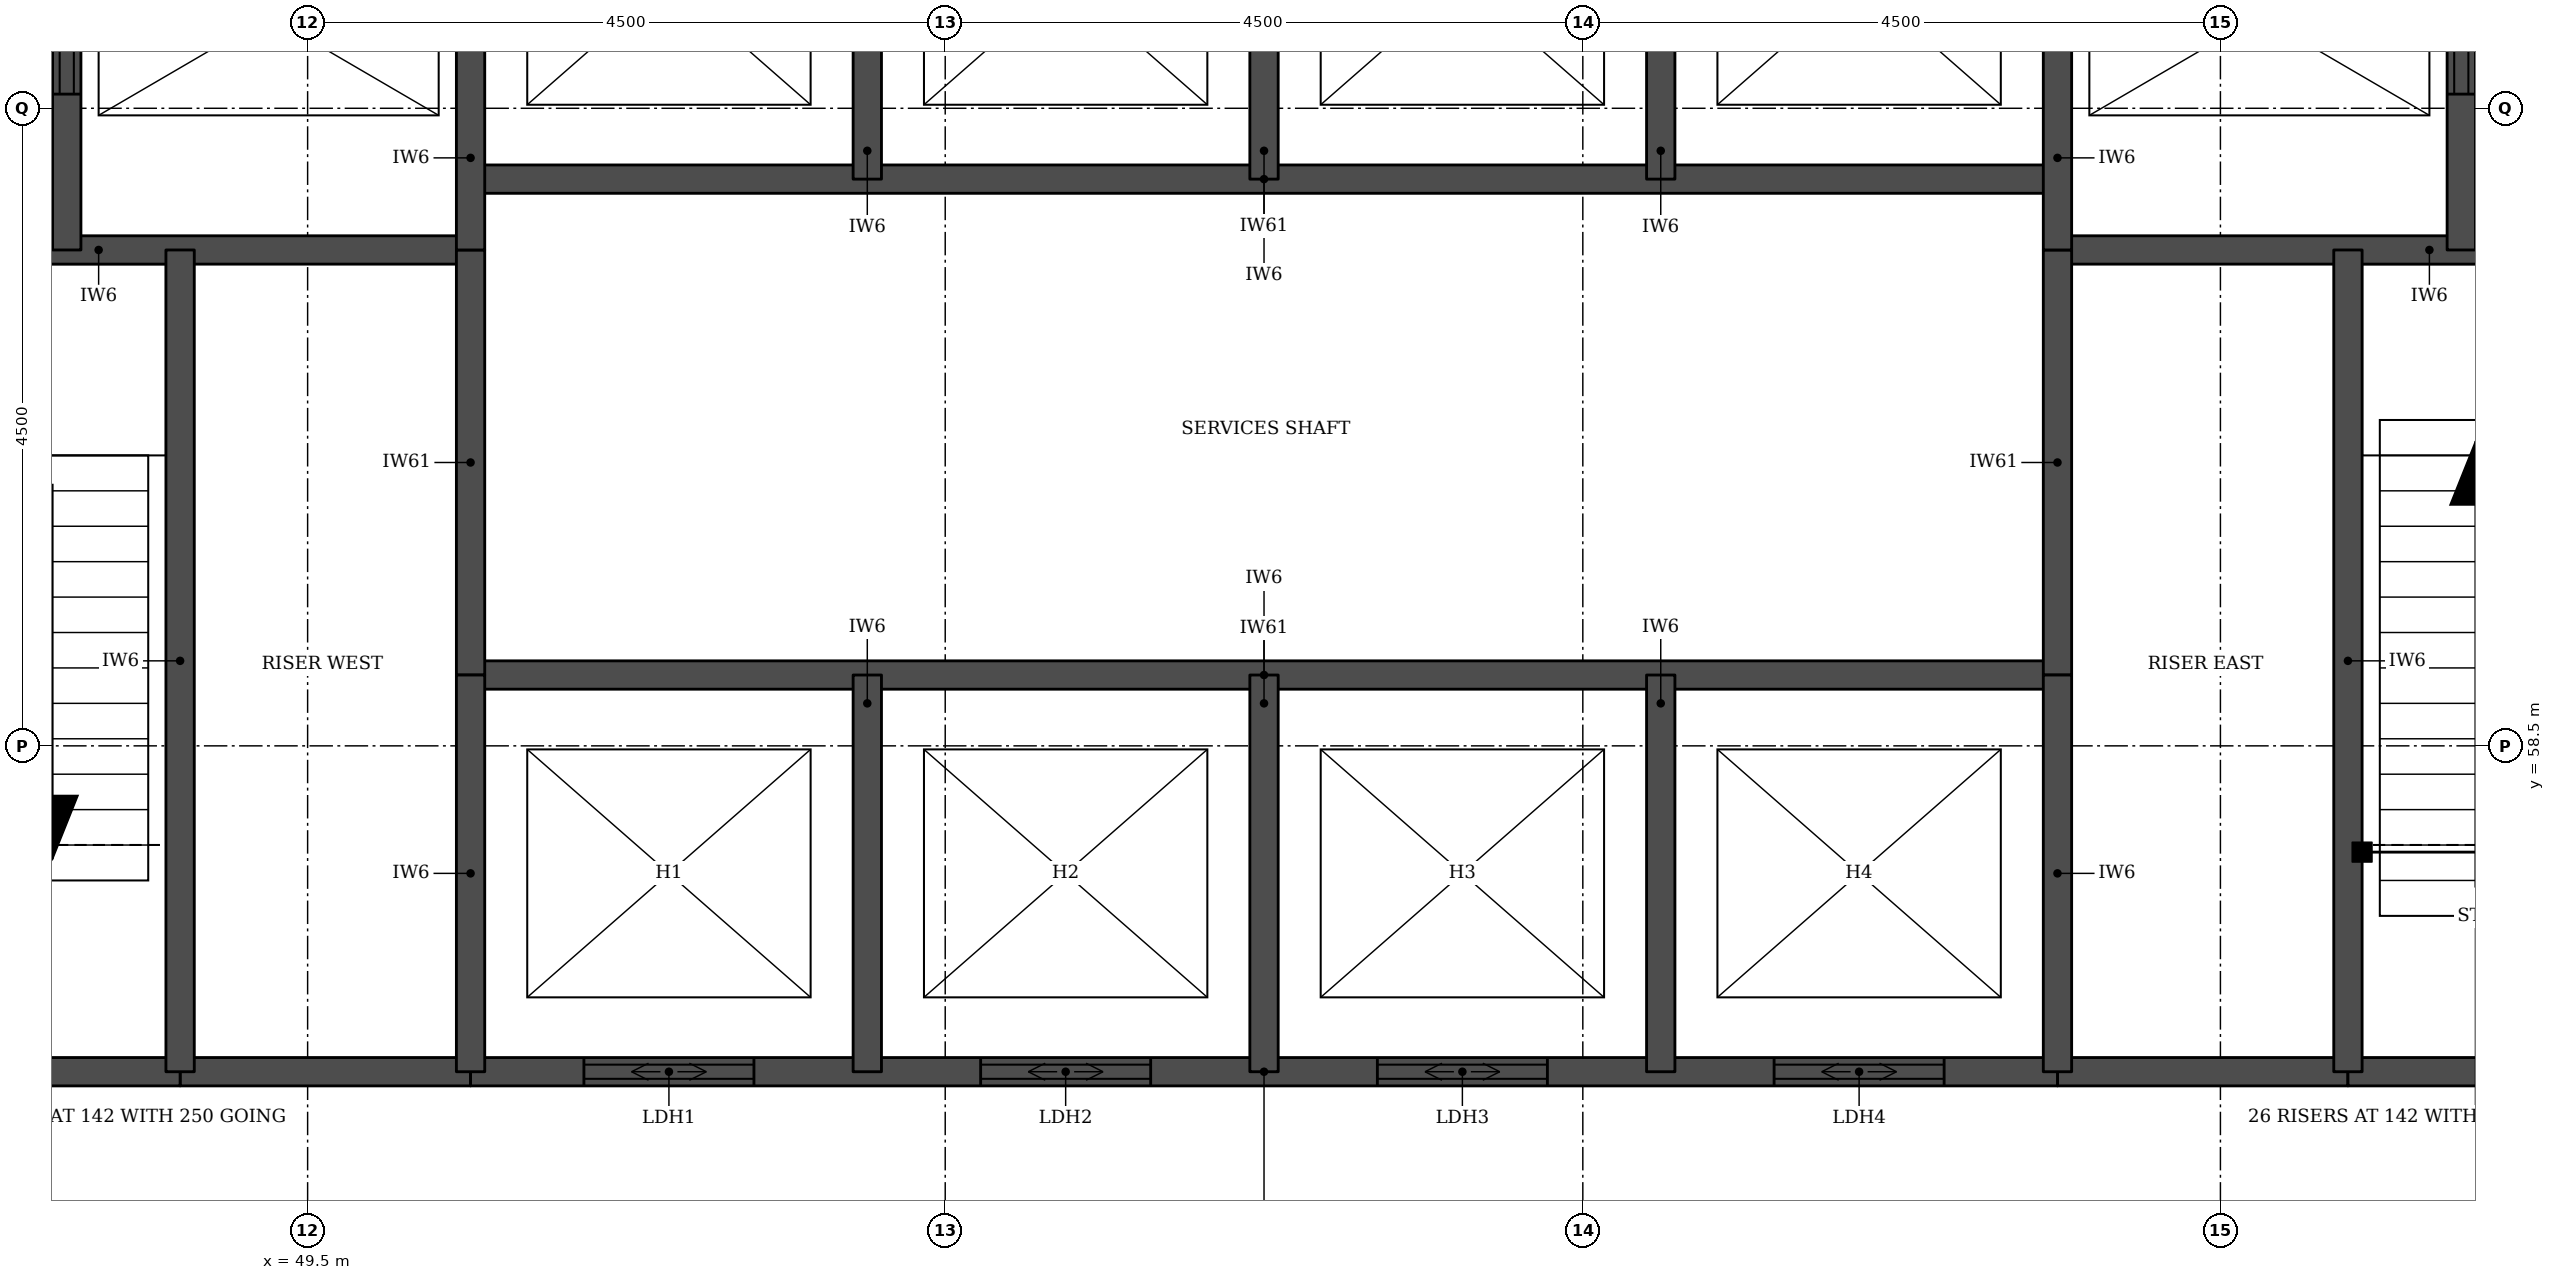
"""IFC4 building model, lengths in metres.
Left out: names, types, materials, properties, quantities, classifications, styles, units other than length and angle.
Written with IfcOpenShell. Run it as: python <this file> out.ifc"""

import sys

from ifc_helpers import new_model, si_unit, direction, frame, frame_2d, origin, place, context, subcontext, project, spatial, rectangle, extrude, element, fill, save


model = new_model("IFC4")
c1 = context("Model", 3, precision=1e-05, world=origin(), true_north=direction((0.0, 1.0)))
c2 = subcontext(c1, "Body", "Model", "MODEL_VIEW")
j1 = project(units=[si_unit("LENGTHUNIT", "METRE"), si_unit("PLANEANGLEUNIT", "RADIAN")], contexts=[c1])
p1 = place(None, origin())
s1 = spatial("IfcSite", under=j1, at=p1, CompositionType="ELEMENT")
p2 = place(p1, origin())
s2 = spatial("IfcBuilding", under=s1, at=p2, CompositionType="ELEMENT")
p3 = place(p2, frame((0.0, 0.0, 162.5)))
s3 = spatial("IfcBuildingStorey", under=s2, at=p3, CompositionType="ELEMENT", Elevation=162.5)
for number, where, z_axis, x_axis in (
    (1, (48.6, 56.2, 0.0), (0.0, 0.0, 1.0), (1.0, 0.0, 0.0)),
    (2, (61.85, 56.2, 0.0), (0.0, 0.0, 1.0), (1.0, 0.0, 0.0)),
):
    element("IfcWall", number, at=place(p3, frame(where, z_axis=z_axis, x_axis=x_axis)), inside=s3, PredefinedType="SOLIDWALL", context=c2, shape_type="SweptSolid", body=[
        extrude(rectangle(XDim=2.05, YDim=0.2, at=frame_2d((1.025, 0.0))), origin(), (0.0, 0.0, 1.0), 3.55),
    ])
p4 = place(p3, frame((45.4, 56.2, 0.0), z_axis=(0.0, 0.0, 1.0), x_axis=(1.0, 0.0, 0.0)))
e3 = element("IfcWall", 3, at=p4, inside=s3, PredefinedType="SOLIDWALL", context=c2, shape_type="SweptSolid", body=[
    extrude(rectangle(XDim=3.2, YDim=0.2, at=frame_2d((1.6, 0.0))), origin(), (0.0, 0.0, 1.0), 3.55),
])
p5 = place(p3, frame((50.65, 56.2, 0.0), z_axis=(0.0, 0.0, 1.0), x_axis=(1.0, 0.0, 0.0)))
e4 = element("IfcWall", 4, at=p5, inside=s3, PredefinedType="SOLIDWALL", context=c2, shape_type="SweptSolid", body=[
    extrude(rectangle(XDim=11.2, YDim=0.2, at=frame_2d((5.6, 0.0))), origin(), (0.0, 0.0, 1.0), 3.55),
])
p6 = place(p5, frame((0.8, 0.0, 0.0)))
e5 = element("IfcOpeningElement", 5, at=p6, cuts=e4, PredefinedType="OPENING", context=c2, shape_type="SweptSolid", body=[
    extrude(rectangle(XDim=1.2, YDim=2.1, at=frame_2d((0.6, 1.05))), frame((0.0, 0.11, 0.0), z_axis=(0.0, -1.0, 0.0), x_axis=(1.0, 0.0, 0.0)), (0.0, 0.0, 1.0), 0.22),
])
p7 = place(p5, frame((3.6, 0.0, 0.0)))
e6 = element("IfcOpeningElement", 6, at=p7, cuts=e4, PredefinedType="OPENING", context=c2, shape_type="SweptSolid", body=[
    extrude(rectangle(XDim=1.2, YDim=2.1, at=frame_2d((0.6, 1.05))), frame((0.0, 0.11, 0.0), z_axis=(0.0, -1.0, 0.0), x_axis=(1.0, 0.0, 0.0)), (0.0, 0.0, 1.0), 0.22),
])
p8 = place(p5, frame((6.4, 0.0, 0.0)))
e7 = element("IfcOpeningElement", 7, at=p8, cuts=e4, PredefinedType="OPENING", context=c2, shape_type="SweptSolid", body=[
    extrude(rectangle(XDim=1.2, YDim=2.1, at=frame_2d((0.6, 1.05))), frame((0.0, 0.11, 0.0), z_axis=(0.0, -1.0, 0.0), x_axis=(1.0, 0.0, 0.0)), (0.0, 0.0, 1.0), 0.22),
])
p9 = place(p5, frame((9.2, 0.0, 0.0)))
e8 = element("IfcOpeningElement", 8, at=p9, cuts=e4, PredefinedType="OPENING", context=c2, shape_type="SweptSolid", body=[
    extrude(rectangle(XDim=1.2, YDim=2.1, at=frame_2d((0.6, 1.05))), frame((0.0, 0.11, 0.0), z_axis=(0.0, -1.0, 0.0), x_axis=(1.0, 0.0, 0.0)), (0.0, 0.0, 1.0), 0.22),
])
p10 = place(p3, frame((63.9, 56.2, 0.0), z_axis=(0.0, 0.0, 1.0), x_axis=(1.0, 0.0, 0.0)))
e9 = element("IfcWall", 9, at=p10, inside=s3, PredefinedType="SOLIDWALL", context=c2, shape_type="SweptSolid", body=[
    extrude(rectangle(XDim=3.2, YDim=0.2, at=frame_2d((1.6, 0.0))), origin(), (0.0, 0.0, 1.0), 3.55),
])
p11 = place(p3, frame((50.65, 59.0, 0.0), z_axis=(0.0, 0.0, 1.0), x_axis=(1.0, 0.0, 0.0)))
e10 = element("IfcWall", 10, at=p11, inside=s3, PredefinedType="SOLIDWALL", context=c2, shape_type="SweptSolid", body=[
    extrude(rectangle(XDim=11.2, YDim=0.2, at=frame_2d((5.6, 0.0))), origin(), (0.0, 0.0, 1.0), 3.7),
])
for number, where, z_axis, x_axis in (
    (11, (45.4, 62.0, 0.0), (0.0, 0.0, 1.0), (1.0, 0.0, 0.0)),
    (12, (61.85, 62.0, 0.0), (0.0, 0.0, 1.0), (1.0, 0.0, 0.0)),
):
    element("IfcWall", number, at=place(p3, frame(where, z_axis=z_axis, x_axis=x_axis)), inside=s3, PredefinedType="SOLIDWALL", context=c2, shape_type="SweptSolid", body=[
        extrude(rectangle(XDim=5.25, YDim=0.2, at=frame_2d((2.625, 0.0))), origin(), (0.0, 0.0, 1.0), 3.55),
    ])
p12 = place(p3, frame((50.65, 62.5, 0.0), z_axis=(0.0, 0.0, 1.0), x_axis=(1.0, 0.0, 0.0)))
e13 = element("IfcWall", 13, at=p12, inside=s3, PredefinedType="SOLIDWALL", context=c2, shape_type="SweptSolid", body=[
    extrude(rectangle(XDim=11.2, YDim=0.2, at=frame_2d((5.6, 0.0))), origin(), (0.0, 0.0, 1.0), 3.7),
])
p13 = place(p3, frame((47.8, 62.0, 0.0), z_axis=(0.0, 0.0, 1.0), x_axis=(0.0, 1.0, 0.0)))
e14 = element("IfcWall", 14, at=p13, inside=s3, PredefinedType="SOLIDWALL", context=c2, shape_type="SweptSolid", body=[
    extrude(rectangle(XDim=3.3, YDim=0.2, at=frame_2d((1.65, 0.0))), origin(), (0.0, 0.0, 1.0), 3.55),
])
p14 = place(p13, frame((1.1, 0.0, 0.0)))
e15 = element("IfcOpeningElement", 15, at=p14, cuts=e14, PredefinedType="OPENING", context=c2, shape_type="SweptSolid", body=[
    extrude(rectangle(XDim=1.1, YDim=2.1, at=frame_2d((0.55, 1.05))), frame((0.0, 0.11, 0.0), z_axis=(0.0, -1.0, 0.0), x_axis=(1.0, 0.0, 0.0)), (0.0, 0.0, 1.0), 0.22),
])
p15 = place(p3, frame((48.6, 56.2, 0.0), z_axis=(0.0, 0.0, 1.0), x_axis=(0.0, 1.0, 0.0)))
e16 = element("IfcWall", 16, at=p15, inside=s3, PredefinedType="SOLIDWALL", context=c2, shape_type="SweptSolid", body=[
    extrude(rectangle(XDim=5.8, YDim=0.2, at=frame_2d((2.9, 0.0))), origin(), (0.0, 0.0, 1.0), 3.55),
])
p16 = place(p3, frame((50.65, 59.0, 0.0), z_axis=(0.0, 0.0, 1.0), x_axis=(0.0, 1.0, 0.0)))
e17 = element("IfcWall", 17, at=p16, inside=s3, PredefinedType="SOLIDWALL", context=c2, shape_type="SweptSolid", body=[
    extrude(rectangle(XDim=3.0, YDim=0.2, at=frame_2d((1.5, 0.0))), origin(), (0.0, 0.0, 1.0), 3.7),
])
p17 = place(p3, frame((50.65, 56.2, 0.0), z_axis=(0.0, 0.0, 1.0), x_axis=(0.0, 1.0, 0.0)))
e18 = element("IfcWall", 18, at=p17, inside=s3, PredefinedType="SOLIDWALL", context=c2, shape_type="SweptSolid", body=[
    extrude(rectangle(XDim=2.8, YDim=0.2, at=frame_2d((1.4, 0.0))), origin(), (0.0, 0.0, 1.0), 3.55),
])
p18 = place(p3, frame((50.65, 62.0, 0.0), z_axis=(0.0, 0.0, 1.0), x_axis=(0.0, 1.0, 0.0)))
e19 = element("IfcWall", 19, at=p18, inside=s3, PredefinedType="SOLIDWALL", context=c2, shape_type="SweptSolid", body=[
    extrude(rectangle(XDim=3.3, YDim=0.2, at=frame_2d((1.65, 0.0))), origin(), (0.0, 0.0, 1.0), 3.55),
])
for number, where, z_axis, x_axis in (
    (20, (53.45, 56.2, 0.0), (0.0, 0.0, 1.0), (0.0, 1.0, 0.0)),
    (21, (53.45, 62.5, 0.0), (0.0, 0.0, 1.0), (0.0, 1.0, 0.0)),
    (22, (56.25, 56.2, 0.0), (0.0, 0.0, 1.0), (0.0, 1.0, 0.0)),
    (23, (56.25, 62.5, 0.0), (0.0, 0.0, 1.0), (0.0, 1.0, 0.0)),
    (24, (59.05, 56.2, 0.0), (0.0, 0.0, 1.0), (0.0, 1.0, 0.0)),
    (25, (59.05, 62.5, 0.0), (0.0, 0.0, 1.0), (0.0, 1.0, 0.0)),
):
    element("IfcWall", number, at=place(p3, frame(where, z_axis=z_axis, x_axis=x_axis)), inside=s3, PredefinedType="SOLIDWALL", context=c2, shape_type="SweptSolid", body=[
        extrude(rectangle(XDim=2.8, YDim=0.2, at=frame_2d((1.4, 0.0))), origin(), (0.0, 0.0, 1.0), 3.55),
    ])
p19 = place(p3, frame((61.85, 59.0, 0.0), z_axis=(0.0, 0.0, 1.0), x_axis=(0.0, 1.0, 0.0)))
e26 = element("IfcWall", 26, at=p19, inside=s3, PredefinedType="SOLIDWALL", context=c2, shape_type="SweptSolid", body=[
    extrude(rectangle(XDim=3.0, YDim=0.2, at=frame_2d((1.5, 0.0))), origin(), (0.0, 0.0, 1.0), 3.7),
])
p20 = place(p3, frame((61.85, 56.2, 0.0), z_axis=(0.0, 0.0, 1.0), x_axis=(0.0, 1.0, 0.0)))
e27 = element("IfcWall", 27, at=p20, inside=s3, PredefinedType="SOLIDWALL", context=c2, shape_type="SweptSolid", body=[
    extrude(rectangle(XDim=2.8, YDim=0.2, at=frame_2d((1.4, 0.0))), origin(), (0.0, 0.0, 1.0), 3.55),
])
p21 = place(p3, frame((61.85, 62.0, 0.0), z_axis=(0.0, 0.0, 1.0), x_axis=(0.0, 1.0, 0.0)))
e28 = element("IfcWall", 28, at=p21, inside=s3, PredefinedType="SOLIDWALL", context=c2, shape_type="SweptSolid", body=[
    extrude(rectangle(XDim=3.3, YDim=0.2, at=frame_2d((1.65, 0.0))), origin(), (0.0, 0.0, 1.0), 3.55),
])
p22 = place(p3, frame((63.9, 56.2, 0.0), z_axis=(0.0, 0.0, 1.0), x_axis=(0.0, 1.0, 0.0)))
e29 = element("IfcWall", 29, at=p22, inside=s3, PredefinedType="SOLIDWALL", context=c2, shape_type="SweptSolid", body=[
    extrude(rectangle(XDim=5.8, YDim=0.2, at=frame_2d((2.9, 0.0))), origin(), (0.0, 0.0, 1.0), 3.55),
])
p23 = place(p3, frame((64.7, 62.0, 0.0), z_axis=(0.0, 0.0, 1.0), x_axis=(0.0, 1.0, 0.0)))
e30 = element("IfcWall", 30, at=p23, inside=s3, PredefinedType="SOLIDWALL", context=c2, shape_type="SweptSolid", body=[
    extrude(rectangle(XDim=3.3, YDim=0.2, at=frame_2d((1.65, 0.0))), origin(), (0.0, 0.0, 1.0), 3.55),
])
p24 = place(p23, frame((1.1, 0.0, 0.0)))
e31 = element("IfcOpeningElement", 31, at=p24, cuts=e30, PredefinedType="OPENING", context=c2, shape_type="SweptSolid", body=[
    extrude(rectangle(XDim=1.1, YDim=2.1, at=frame_2d((0.55, 1.05))), frame((0.0, 0.11, 0.0), z_axis=(0.0, -1.0, 0.0), x_axis=(1.0, 0.0, 0.0)), (0.0, 0.0, 1.0), 0.22),
])
p25 = place(p6, origin())
e32 = element("IfcDoor", 32, at=p25, inside=s3, OperationType="DOUBLE_DOOR_SLIDING", PredefinedType="DOOR", context=c2, shape_type="SweptSolid", body=[
    extrude(rectangle(XDim=1.2, YDim=2.1, at=frame_2d((0.6, 1.05))), frame((0.0, 0.025, 0.0), z_axis=(0.0, -1.0, 0.0), x_axis=(1.0, 0.0, 0.0)), (0.0, 0.0, 1.0), 0.05),
])
fill(e5, e32)
p26 = place(p7, origin())
e33 = element("IfcDoor", 33, at=p26, inside=s3, OperationType="DOUBLE_DOOR_SLIDING", PredefinedType="DOOR", context=c2, shape_type="SweptSolid", body=[
    extrude(rectangle(XDim=1.2, YDim=2.1, at=frame_2d((0.6, 1.05))), frame((0.0, 0.025, 0.0), z_axis=(0.0, -1.0, 0.0), x_axis=(1.0, 0.0, 0.0)), (0.0, 0.0, 1.0), 0.05),
])
fill(e6, e33)
p27 = place(p8, origin())
e34 = element("IfcDoor", 34, at=p27, inside=s3, OperationType="DOUBLE_DOOR_SLIDING", PredefinedType="DOOR", context=c2, shape_type="SweptSolid", body=[
    extrude(rectangle(XDim=1.2, YDim=2.1, at=frame_2d((0.6, 1.05))), frame((0.0, 0.025, 0.0), z_axis=(0.0, -1.0, 0.0), x_axis=(1.0, 0.0, 0.0)), (0.0, 0.0, 1.0), 0.05),
])
fill(e7, e34)
p28 = place(p9, origin())
e35 = element("IfcDoor", 35, at=p28, inside=s3, OperationType="DOUBLE_DOOR_SLIDING", PredefinedType="DOOR", context=c2, shape_type="SweptSolid", body=[
    extrude(rectangle(XDim=1.2, YDim=2.1, at=frame_2d((0.6, 1.05))), frame((0.0, 0.025, 0.0), z_axis=(0.0, -1.0, 0.0), x_axis=(1.0, 0.0, 0.0)), (0.0, 0.0, 1.0), 0.05),
])
fill(e8, e35)
p29 = place(p14, origin())
e36 = element("IfcDoor", 36, at=p29, inside=s3, OperationType="DOUBLE_DOOR_SLIDING", PredefinedType="DOOR", context=c2, shape_type="SweptSolid", body=[
    extrude(rectangle(XDim=1.1, YDim=2.1, at=frame_2d((0.55, 1.05))), frame((0.0, 0.025, 0.0), z_axis=(0.0, -1.0, 0.0), x_axis=(1.0, 0.0, 0.0)), (0.0, 0.0, 1.0), 0.05),
])
fill(e15, e36)
p30 = place(p24, origin())
e37 = element("IfcDoor", 37, at=p30, inside=s3, OperationType="DOUBLE_DOOR_SLIDING", PredefinedType="DOOR", context=c2, shape_type="SweptSolid", body=[
    extrude(rectangle(XDim=1.1, YDim=2.1, at=frame_2d((0.55, 1.05))), frame((0.0, 0.025, 0.0), z_axis=(0.0, -1.0, 0.0), x_axis=(1.0, 0.0, 0.0)), (0.0, 0.0, 1.0), 0.05),
])
fill(e31, e37)
save(model, sys.argv[1])
